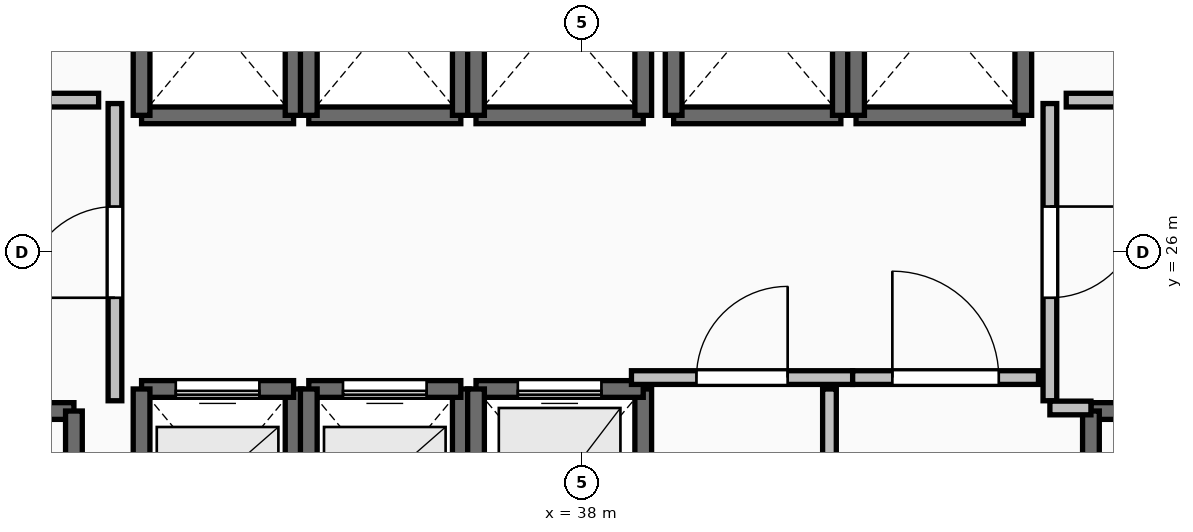
"""IFC4 building model, lengths in metres.
Left out: names, types, materials, properties, quantities, classifications, styles, units other than length and angle.
Written with IfcOpenShell. Run it as: python <this file> out.ifc"""

import sys

from ifc_helpers import new_model, si_unit, direction, frame, frame_2d, origin, place, context, subcontext, project, spatial, rectangle, extrude, element, fill, save


model = new_model("IFC4")
c1 = context("Model", 3, precision=1e-05, world=origin(), true_north=direction((0.0, 1.0)))
c2 = subcontext(c1, "Body", "Model", "MODEL_VIEW")
j1 = project(units=[si_unit("LENGTHUNIT", "METRE"), si_unit("PLANEANGLEUNIT", "RADIAN")], contexts=[c1])
p1 = place(None, origin())
s1 = spatial("IfcSite", under=j1, at=p1, CompositionType="ELEMENT")
p2 = place(p1, origin())
s2 = spatial("IfcBuilding", under=s1, at=p2, CompositionType="ELEMENT")
p3 = place(p2, frame((0.0, 0.0, 124.3)))
s3 = spatial("IfcBuildingStorey", under=s2, at=p3, CompositionType="ELEMENT", Elevation=124.3)
p4 = place(p3, frame((27.94, 23.91, 0.0), z_axis=(0.0, 0.0, 1.0), x_axis=(1.0, 0.0, 0.0)))
e1 = element("IfcWall", 1, at=p4, inside=s3, PredefinedType="SOLIDWALL", context=c2, shape_type="SweptSolid", body=[
    extrude(rectangle(XDim=3.37, YDim=0.22, at=frame_2d((1.685, 0.0))), origin(), (0.0, 0.0, 1.0), 4.54),
])
p5 = place(p4, frame((1.135, 0.0, 0.0)))
e2 = element("IfcOpeningElement", 2, at=p5, cuts=e1, PredefinedType="OPENING", context=c2, shape_type="SweptSolid", body=[
    extrude(rectangle(XDim=1.1, YDim=2.15, at=frame_2d((0.55, 1.075))), frame((0.0, 0.125, 0.0), z_axis=(0.0, -1.0, 0.0), x_axis=(1.0, 0.0, 0.0)), (0.0, 0.0, 1.0), 0.25),
])
p6 = place(p3, frame((31.31, 23.91, 0.0), z_axis=(0.0, 0.0, 1.0), x_axis=(0.0, -1.0, 0.0)))
e3 = element("IfcWall", 3, at=p6, inside=s3, PredefinedType="SOLIDWALL", context=c2, shape_type="SweptSolid", body=[
    extrude(rectangle(XDim=7.42, YDim=0.22, at=frame_2d((3.71, 0.0))), origin(), (0.0, 0.0, 1.0), 4.54),
])
p7 = place(p3, frame((44.69, 23.91, 0.0), z_axis=(0.0, 0.0, 1.0), x_axis=(1.0, 0.0, 0.0)))
e4 = element("IfcWall", 4, at=p7, inside=s3, PredefinedType="SOLIDWALL", context=c2, shape_type="SweptSolid", body=[
    extrude(rectangle(XDim=3.37, YDim=0.22, at=frame_2d((1.685, 0.0))), origin(), (0.0, 0.0, 1.0), 4.54),
])
p8 = place(p7, frame((1.135, 0.0, 0.0)))
e5 = element("IfcOpeningElement", 5, at=p8, cuts=e4, PredefinedType="OPENING", context=c2, shape_type="SweptSolid", body=[
    extrude(rectangle(XDim=1.1, YDim=2.15, at=frame_2d((0.55, 1.075))), frame((0.0, 0.125, 0.0), z_axis=(0.0, -1.0, 0.0), x_axis=(1.0, 0.0, 0.0)), (0.0, 0.0, 1.0), 0.25),
])
p9 = place(p3, frame((44.69, 16.49, 0.0), z_axis=(0.0, 0.0, 1.0), x_axis=(0.0, 1.0, 0.0)))
e6 = element("IfcWall", 6, at=p9, inside=s3, PredefinedType="SOLIDWALL", context=c2, shape_type="SweptSolid", body=[
    extrude(rectangle(XDim=7.42, YDim=0.22, at=frame_2d((3.71, 0.0))), origin(), (0.0, 0.0, 1.0), 4.54),
])
p10 = place(p3, frame((32.2, 27.8, 0.0), z_axis=(0.0, 0.0, 1.0), x_axis=(1.0, 0.0, 0.0)))
e7 = element("IfcWall", 7, at=p10, inside=s3, PredefinedType="SOLIDWALL", context=c2, shape_type="SweptSolid", body=[
    extrude(rectangle(XDim=2.0, YDim=0.22, at=frame_2d((1.0, 0.0))), origin(), (0.0, 0.0, 1.0), 4.54),
])
for number, where, z_axis, x_axis in (
    (8, (34.2, 27.8, 0.0), (0.0, 0.0, 1.0), (0.0, 1.0, 0.0)),
    (9, (32.2, 30.2, 0.0), (0.0, 0.0, 1.0), (0.0, -1.0, 0.0)),
):
    element("IfcWall", number, at=place(p3, frame(where, z_axis=z_axis, x_axis=x_axis)), inside=s3, PredefinedType="SOLIDWALL", context=c2, shape_type="SweptSolid", body=[
        extrude(rectangle(XDim=2.4, YDim=0.22, at=frame_2d((1.2, 0.0))), origin(), (0.0, 0.0, 1.0), 4.54),
    ])
p11 = place(p3, frame((34.4, 27.8, 0.0), z_axis=(0.0, 0.0, 1.0), x_axis=(1.0, 0.0, 0.0)))
e10 = element("IfcWall", 10, at=p11, inside=s3, PredefinedType="SOLIDWALL", context=c2, shape_type="SweptSolid", body=[
    extrude(rectangle(XDim=2.0, YDim=0.22, at=frame_2d((1.0, 0.0))), origin(), (0.0, 0.0, 1.0), 4.54),
])
for number, where, z_axis, x_axis in (
    (11, (36.4, 27.8, 0.0), (0.0, 0.0, 1.0), (0.0, 1.0, 0.0)),
    (12, (34.4, 30.2, 0.0), (0.0, 0.0, 1.0), (0.0, -1.0, 0.0)),
):
    element("IfcWall", number, at=place(p3, frame(where, z_axis=z_axis, x_axis=x_axis)), inside=s3, PredefinedType="SOLIDWALL", context=c2, shape_type="SweptSolid", body=[
        extrude(rectangle(XDim=2.4, YDim=0.22, at=frame_2d((1.2, 0.0))), origin(), (0.0, 0.0, 1.0), 4.54),
    ])
p12 = place(p3, frame((36.6, 27.8, 0.0), z_axis=(0.0, 0.0, 1.0), x_axis=(1.0, 0.0, 0.0)))
e13 = element("IfcWall", 13, at=p12, inside=s3, PredefinedType="SOLIDWALL", context=c2, shape_type="SweptSolid", body=[
    extrude(rectangle(XDim=2.2, YDim=0.22, at=frame_2d((1.1, 0.0))), origin(), (0.0, 0.0, 1.0), 4.54),
])
for number, where, z_axis, x_axis in (
    (14, (38.8, 27.8, 0.0), (0.0, 0.0, 1.0), (0.0, 1.0, 0.0)),
    (15, (36.6, 30.4, 0.0), (0.0, 0.0, 1.0), (0.0, -1.0, 0.0)),
):
    element("IfcWall", number, at=place(p3, frame(where, z_axis=z_axis, x_axis=x_axis)), inside=s3, PredefinedType="SOLIDWALL", context=c2, shape_type="SweptSolid", body=[
        extrude(rectangle(XDim=2.6, YDim=0.22, at=frame_2d((1.3, 0.0))), origin(), (0.0, 0.0, 1.0), 4.54),
    ])
p13 = place(p3, frame((34.2, 21.8, 0.0), z_axis=(0.0, 0.0, 1.0), x_axis=(0.0, 1.0, 0.0)))
e16 = element("IfcWall", 16, at=p13, inside=s3, PredefinedType="SOLIDWALL", context=c2, shape_type="SweptSolid", body=[
    extrude(rectangle(XDim=2.4, YDim=0.22, at=frame_2d((1.2, 0.0))), origin(), (0.0, 0.0, 1.0), 4.54),
])
p14 = place(p3, frame((34.2, 24.2, 0.0), z_axis=(0.0, 0.0, 1.0), x_axis=(-1.0, 0.0, 0.0)))
e17 = element("IfcWall", 17, at=p14, inside=s3, PredefinedType="SOLIDWALL", context=c2, shape_type="SweptSolid", body=[
    extrude(rectangle(XDim=2.0, YDim=0.22, at=frame_2d((1.0, 0.0))), origin(), (0.0, 0.0, 1.0), 4.54),
])
p15 = place(p14, frame((0.45, 0.0, 0.0)))
e18 = element("IfcOpeningElement", 18, at=p15, cuts=e17, PredefinedType="OPENING", context=c2, shape_type="SweptSolid", body=[
    extrude(rectangle(XDim=1.1, YDim=2.2, at=frame_2d((0.55, 1.1))), frame((0.0, 0.125, 0.0), z_axis=(0.0, -1.0, 0.0), x_axis=(1.0, 0.0, 0.0)), (0.0, 0.0, 1.0), 0.25),
])
for number, where, z_axis, x_axis in (
    (19, (32.2, 24.2, 0.0), (0.0, 0.0, 1.0), (0.0, -1.0, 0.0)),
    (20, (36.4, 21.8, 0.0), (0.0, 0.0, 1.0), (0.0, 1.0, 0.0)),
):
    element("IfcWall", number, at=place(p3, frame(where, z_axis=z_axis, x_axis=x_axis)), inside=s3, PredefinedType="SOLIDWALL", context=c2, shape_type="SweptSolid", body=[
        extrude(rectangle(XDim=2.4, YDim=0.22, at=frame_2d((1.2, 0.0))), origin(), (0.0, 0.0, 1.0), 4.54),
    ])
p16 = place(p3, frame((36.4, 24.2, 0.0), z_axis=(0.0, 0.0, 1.0), x_axis=(-1.0, 0.0, 0.0)))
e21 = element("IfcWall", 21, at=p16, inside=s3, PredefinedType="SOLIDWALL", context=c2, shape_type="SweptSolid", body=[
    extrude(rectangle(XDim=2.0, YDim=0.22, at=frame_2d((1.0, 0.0))), origin(), (0.0, 0.0, 1.0), 4.54),
])
p17 = place(p16, frame((0.45, 0.0, 0.0)))
e22 = element("IfcOpeningElement", 22, at=p17, cuts=e21, PredefinedType="OPENING", context=c2, shape_type="SweptSolid", body=[
    extrude(rectangle(XDim=1.1, YDim=2.2, at=frame_2d((0.55, 1.1))), frame((0.0, 0.125, 0.0), z_axis=(0.0, -1.0, 0.0), x_axis=(1.0, 0.0, 0.0)), (0.0, 0.0, 1.0), 0.25),
])
p18 = place(p3, frame((34.4, 24.2, 0.0), z_axis=(0.0, 0.0, 1.0), x_axis=(0.0, -1.0, 0.0)))
e23 = element("IfcWall", 23, at=p18, inside=s3, PredefinedType="SOLIDWALL", context=c2, shape_type="SweptSolid", body=[
    extrude(rectangle(XDim=2.4, YDim=0.22, at=frame_2d((1.2, 0.0))), origin(), (0.0, 0.0, 1.0), 4.54),
])
p19 = place(p3, frame((38.8, 21.6, 0.0), z_axis=(0.0, 0.0, 1.0), x_axis=(0.0, 1.0, 0.0)))
e24 = element("IfcWall", 24, at=p19, inside=s3, PredefinedType="SOLIDWALL", context=c2, shape_type="SweptSolid", body=[
    extrude(rectangle(XDim=2.6, YDim=0.22, at=frame_2d((1.3, 0.0))), origin(), (0.0, 0.0, 1.0), 4.54),
])
p20 = place(p3, frame((38.8, 24.2, 0.0), z_axis=(0.0, 0.0, 1.0), x_axis=(-1.0, 0.0, 0.0)))
e25 = element("IfcWall", 25, at=p20, inside=s3, PredefinedType="SOLIDWALL", context=c2, shape_type="SweptSolid", body=[
    extrude(rectangle(XDim=2.2, YDim=0.22, at=frame_2d((1.1, 0.0))), origin(), (0.0, 0.0, 1.0), 4.54),
])
p21 = place(p20, frame((0.55, 0.0, 0.0)))
e26 = element("IfcOpeningElement", 26, at=p21, cuts=e25, PredefinedType="OPENING", context=c2, shape_type="SweptSolid", body=[
    extrude(rectangle(XDim=1.1, YDim=2.2, at=frame_2d((0.55, 1.1))), frame((0.0, 0.125, 0.0), z_axis=(0.0, -1.0, 0.0), x_axis=(1.0, 0.0, 0.0)), (0.0, 0.0, 1.0), 0.25),
])
p22 = place(p3, frame((36.6, 24.2, 0.0), z_axis=(0.0, 0.0, 1.0), x_axis=(0.0, -1.0, 0.0)))
e27 = element("IfcWall", 27, at=p22, inside=s3, PredefinedType="SOLIDWALL", context=c2, shape_type="SweptSolid", body=[
    extrude(rectangle(XDim=2.6, YDim=0.22, at=frame_2d((1.3, 0.0))), origin(), (0.0, 0.0, 1.0), 4.54),
])
p23 = place(p3, frame((39.2, 27.8, 0.0), z_axis=(0.0, 0.0, 1.0), x_axis=(1.0, 0.0, 0.0)))
e28 = element("IfcWall", 28, at=p23, inside=s3, PredefinedType="SOLIDWALL", context=c2, shape_type="SweptSolid", body=[
    extrude(rectangle(XDim=2.2, YDim=0.22, at=frame_2d((1.1, 0.0))), origin(), (0.0, 0.0, 1.0), 4.54),
])
for number, where, z_axis, x_axis in (
    (29, (41.4, 27.8, 0.0), (0.0, 0.0, 1.0), (0.0, 1.0, 0.0)),
    (30, (39.2, 30.4, 0.0), (0.0, 0.0, 1.0), (0.0, -1.0, 0.0)),
):
    element("IfcWall", number, at=place(p3, frame(where, z_axis=z_axis, x_axis=x_axis)), inside=s3, PredefinedType="SOLIDWALL", context=c2, shape_type="SweptSolid", body=[
        extrude(rectangle(XDim=2.6, YDim=0.22, at=frame_2d((1.3, 0.0))), origin(), (0.0, 0.0, 1.0), 4.54),
    ])
p24 = place(p3, frame((41.6, 27.8, 0.0), z_axis=(0.0, 0.0, 1.0), x_axis=(1.0, 0.0, 0.0)))
e31 = element("IfcWall", 31, at=p24, inside=s3, PredefinedType="SOLIDWALL", context=c2, shape_type="SweptSolid", body=[
    extrude(rectangle(XDim=2.2, YDim=0.22, at=frame_2d((1.1, 0.0))), origin(), (0.0, 0.0, 1.0), 4.54),
])
for number, where, z_axis, x_axis in (
    (32, (43.8, 27.8, 0.0), (0.0, 0.0, 1.0), (0.0, 1.0, 0.0)),
    (33, (41.6, 30.4, 0.0), (0.0, 0.0, 1.0), (0.0, -1.0, 0.0)),
):
    element("IfcWall", number, at=place(p3, frame(where, z_axis=z_axis, x_axis=x_axis)), inside=s3, PredefinedType="SOLIDWALL", context=c2, shape_type="SweptSolid", body=[
        extrude(rectangle(XDim=2.6, YDim=0.22, at=frame_2d((1.3, 0.0))), origin(), (0.0, 0.0, 1.0), 4.54),
    ])
p25 = place(p3, frame((31.85, 24.045, 0.0), z_axis=(0.0, 0.0, 1.0), x_axis=(0.0, 1.0, 0.0)))
e34 = element("IfcWall", 34, at=p25, inside=s3, PredefinedType="PARTITIONING", context=c2, shape_type="SweptSolid", body=[
    extrude(rectangle(XDim=3.91, YDim=0.18, at=frame_2d((1.955, 0.0))), origin(), (0.0, 0.0, 1.0), 4.54),
])
p26 = place(p25, frame((1.355, 0.0, 0.0)))
e35 = element("IfcOpeningElement", 35, at=p26, cuts=e34, PredefinedType="OPENING", context=c2, shape_type="SweptSolid", body=[
    extrude(rectangle(XDim=1.2, YDim=2.15, at=frame_2d((0.6, 1.075))), frame((0.0, 0.105, 0.0), z_axis=(0.0, -1.0, 0.0), x_axis=(1.0, 0.0, 0.0)), (0.0, 0.0, 1.0), 0.21),
])
p27 = place(p3, frame((44.15, 27.955, 0.0), z_axis=(0.0, 0.0, 1.0), x_axis=(0.0, -1.0, 0.0)))
e36 = element("IfcWall", 36, at=p27, inside=s3, PredefinedType="PARTITIONING", context=c2, shape_type="SweptSolid", body=[
    extrude(rectangle(XDim=3.91, YDim=0.18, at=frame_2d((1.955, 0.0))), origin(), (0.0, 0.0, 1.0), 4.54),
])
p28 = place(p27, frame((1.355, 0.0, 0.0)))
e37 = element("IfcOpeningElement", 37, at=p28, cuts=e36, PredefinedType="OPENING", context=c2, shape_type="SweptSolid", body=[
    extrude(rectangle(XDim=1.2, YDim=2.15, at=frame_2d((0.6, 1.075))), frame((0.0, 0.105, 0.0), z_axis=(0.0, -1.0, 0.0), x_axis=(1.0, 0.0, 0.0)), (0.0, 0.0, 1.0), 0.21),
])
p29 = place(p3, frame((44.15, 23.95, 0.0), z_axis=(0.0, 0.0, 1.0), x_axis=(1.0, 0.0, 0.0)))
e38 = element("IfcWall", 38, at=p29, inside=s3, PredefinedType="PARTITIONING", context=c2, shape_type="SweptSolid", body=[
    extrude(rectangle(XDim=0.54, YDim=0.18, at=frame_2d((0.27, 0.0))), origin(), (0.0, 0.0, 1.0), 4.54),
])
p30 = place(p3, frame((38.645, 24.35, 0.0), z_axis=(0.0, 0.0, 1.0), x_axis=(1.0, 0.0, 0.0)))
e39 = element("IfcWall", 39, at=p30, inside=s3, PredefinedType="PARTITIONING", context=c2, shape_type="SweptSolid", body=[
    extrude(rectangle(XDim=2.91, YDim=0.18, at=frame_2d((1.455, 0.0))), origin(), (0.0, 0.0, 1.0), 4.54),
])
p31 = place(p30, frame((0.855, 0.0, 0.0)))
e40 = element("IfcOpeningElement", 40, at=p31, cuts=e39, PredefinedType="OPENING", context=c2, shape_type="SweptSolid", body=[
    extrude(rectangle(XDim=1.2, YDim=2.15, at=frame_2d((0.6, 1.075))), frame((0.0, 0.105, 0.0), z_axis=(0.0, -1.0, 0.0), x_axis=(1.0, 0.0, 0.0)), (0.0, 0.0, 1.0), 0.21),
])
p32 = place(p3, frame((41.555, 24.35, 0.0), z_axis=(0.0, 0.0, 1.0), x_axis=(1.0, 0.0, 0.0)))
e41 = element("IfcWall", 41, at=p32, inside=s3, PredefinedType="PARTITIONING", context=c2, shape_type="SweptSolid", body=[
    extrude(rectangle(XDim=2.445, YDim=0.18, at=frame_2d((1.223, 0.0))), origin(), (0.0, 0.0, 1.0), 4.54),
])
p33 = place(p32, frame((0.522, 0.0, 0.0)))
e42 = element("IfcOpeningElement", 42, at=p33, cuts=e41, PredefinedType="OPENING", context=c2, shape_type="SweptSolid", body=[
    extrude(rectangle(XDim=1.4, YDim=2.2, at=frame_2d((0.7, 1.1))), frame((0.0, 0.105, 0.0), z_axis=(0.0, -1.0, 0.0), x_axis=(1.0, 0.0, 0.0)), (0.0, 0.0, 1.0), 0.21),
])
p34 = place(p3, frame((41.25, 19.105, 0.0), z_axis=(0.0, 0.0, 1.0), x_axis=(0.0, 1.0, 0.0)))
e43 = element("IfcWall", 43, at=p34, inside=s3, PredefinedType="PARTITIONING", context=c2, shape_type="SweptSolid", body=[
    extrude(rectangle(XDim=5.095, YDim=0.18, at=frame_2d((2.547, 0.0))), origin(), (0.0, 0.0, 1.0), 4.54),
])
p35 = place(p34, frame((1.847, 0.0, 0.0)))
e44 = element("IfcOpeningElement", 44, at=p35, cuts=e43, PredefinedType="OPENING", context=c2, shape_type="SweptSolid", body=[
    extrude(rectangle(XDim=1.4, YDim=2.2, at=frame_2d((0.7, 1.1))), frame((0.0, 0.105, 0.0), z_axis=(0.0, -1.0, 0.0), x_axis=(1.0, 0.0, 0.0)), (0.0, 0.0, 1.0), 0.21),
])
for number, where, z_axis, x_axis in (
    (45, (31.635, 28.0, 0.0), (0.0, 0.0, 1.0), (-1.0, 0.0, 0.0)),
    (46, (45.28, 28.0, 0.0), (0.0, 0.0, 1.0), (-1.0, 0.0, 0.0)),
):
    element("IfcWall", number, at=place(p3, frame(where, z_axis=z_axis, x_axis=x_axis)), inside=s3, PredefinedType="PARTITIONING", context=c2, shape_type="SweptSolid", body=[
        extrude(rectangle(XDim=0.915, YDim=0.18, at=frame_2d((0.458, 0.0))), origin(), (0.0, 0.0, 1.0), 4.54),
    ])
p36 = place(p15, origin())
e47 = element("IfcDoor", 47, at=p36, inside=s3, OperationType="SLIDING_TO_LEFT", PredefinedType="DOOR", context=c2, shape_type="SweptSolid", body=[
    extrude(rectangle(XDim=1.1, YDim=2.2, at=frame_2d((0.55, 1.1))), frame((0.0, 0.025, 0.0), z_axis=(0.0, -1.0, 0.0), x_axis=(1.0, 0.0, 0.0)), (0.0, 0.0, 1.0), 0.05),
])
fill(e18, e47)
p37 = place(p17, origin())
e48 = element("IfcDoor", 48, at=p37, inside=s3, OperationType="SLIDING_TO_LEFT", PredefinedType="DOOR", context=c2, shape_type="SweptSolid", body=[
    extrude(rectangle(XDim=1.1, YDim=2.2, at=frame_2d((0.55, 1.1))), frame((0.0, 0.025, 0.0), z_axis=(0.0, -1.0, 0.0), x_axis=(1.0, 0.0, 0.0)), (0.0, 0.0, 1.0), 0.05),
])
fill(e22, e48)
p38 = place(p21, origin())
e49 = element("IfcDoor", 49, at=p38, inside=s3, OperationType="SLIDING_TO_LEFT", PredefinedType="DOOR", context=c2, shape_type="SweptSolid", body=[
    extrude(rectangle(XDim=1.1, YDim=2.2, at=frame_2d((0.55, 1.1))), frame((0.0, 0.025, 0.0), z_axis=(0.0, -1.0, 0.0), x_axis=(1.0, 0.0, 0.0)), (0.0, 0.0, 1.0), 0.05),
])
fill(e26, e49)
p39 = place(p26, origin())
e50 = element("IfcDoor", 50, at=p39, inside=s3, OperationType="SINGLE_SWING_LEFT", PredefinedType="DOOR", context=c2, shape_type="SweptSolid", body=[
    extrude(rectangle(XDim=1.2, YDim=2.15, at=frame_2d((0.6, 1.075))), frame((0.0, 0.025, 0.0), z_axis=(0.0, -1.0, 0.0), x_axis=(1.0, 0.0, 0.0)), (0.0, 0.0, 1.0), 0.05),
])
fill(e35, e50)
p40 = place(p28, origin())
e51 = element("IfcDoor", 51, at=p40, inside=s3, OperationType="SINGLE_SWING_LEFT", PredefinedType="DOOR", context=c2, shape_type="SweptSolid", body=[
    extrude(rectangle(XDim=1.2, YDim=2.15, at=frame_2d((0.6, 1.075))), frame((0.0, 0.025, 0.0), z_axis=(0.0, -1.0, 0.0), x_axis=(1.0, 0.0, 0.0)), (0.0, 0.0, 1.0), 0.05),
])
fill(e37, e51)
p41 = place(p31, origin())
e52 = element("IfcDoor", 52, at=p41, inside=s3, OperationType="SINGLE_SWING_RIGHT", PredefinedType="DOOR", context=c2, shape_type="SweptSolid", body=[
    extrude(rectangle(XDim=1.2, YDim=2.15, at=frame_2d((0.6, 1.075))), frame((0.0, 0.025, 0.0), z_axis=(0.0, -1.0, 0.0), x_axis=(1.0, 0.0, 0.0)), (0.0, 0.0, 1.0), 0.05),
])
fill(e40, e52)
p42 = place(p33, origin())
e53 = element("IfcDoor", 53, at=p42, inside=s3, OperationType="DOUBLE_SWING_LEFT", PredefinedType="DOOR", context=c2, shape_type="SweptSolid", body=[
    extrude(rectangle(XDim=1.4, YDim=2.2, at=frame_2d((0.7, 1.1))), frame((0.0, 0.025, 0.0), z_axis=(0.0, -1.0, 0.0), x_axis=(1.0, 0.0, 0.0)), (0.0, 0.0, 1.0), 0.05),
])
fill(e42, e53)
save(model, sys.argv[1])
